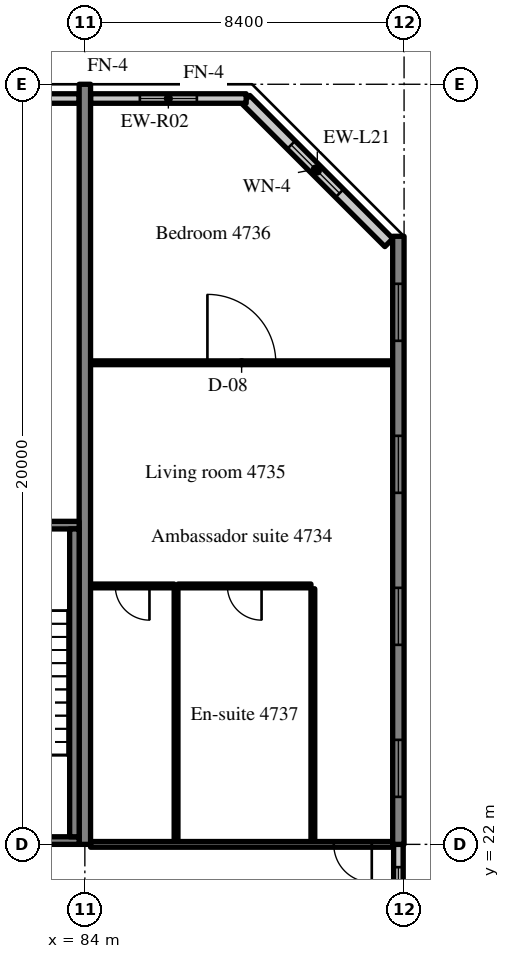
"""IFC4 building model, lengths in metres.
Left out: names, types, materials, properties, quantities, classifications, styles, units other than length and angle.
Written with IfcOpenShell. Run it as: python <this file> out.ifc"""

import sys

from ifc_helpers import new_model, si_unit, direction, frame, frame_2d, origin, place, context, subcontext, project, spatial, rectangle, extrude, source, transform, mapped, element, fill, save


model = new_model("IFC4")
c1 = context("Model", 3, precision=1e-05, world=origin(), true_north=direction((0.0, 1.0)))
c2 = subcontext(c1, "Body", "Model", "MODEL_VIEW")
j1 = project(units=[si_unit("LENGTHUNIT", "METRE"), si_unit("PLANEANGLEUNIT", "RADIAN")], contexts=[c1])
p1 = place(None, origin())
s1 = spatial("IfcSite", under=j1, at=p1, CompositionType="ELEMENT")
p2 = place(p1, origin())
s2 = spatial("IfcBuilding", under=s1, at=p2, CompositionType="ELEMENT")
p3 = place(p2, frame((0.0, 0.0, 193.4)))
s3 = spatial("IfcBuildingStorey", under=s2, at=p3, CompositionType="ELEMENT", Elevation=193.4)
m1 = source(origin(), c2, "Body", "SweptSolid", [
    extrude(rectangle(XDim=20.0, YDim=0.3, at=frame_2d((10.0, 0.0))), origin(), (0.0, 0.0, 1.0), 3.52),
])
p4 = place(p3, frame((84.0, 22.0, 0.0), z_axis=(0.0, 0.0, 1.0), x_axis=(0.0, 1.0, 0.0)))
e1 = element("IfcWall", 1, at=p4, inside=s3, PredefinedType="SHEAR", context=c2, shape_type="MappedRepresentation", body=[
    mapped(m1, transform((0.0, 0.0, 0.0), scale=1.0)),
])
m2 = source(origin(), c2, "Body", "SweptSolid", [
    extrude(rectangle(XDim=16.0, YDim=0.3, at=frame_2d((8.0, 0.0))), origin(), (0.0, 0.0, 1.0), 3.52),
])
p5 = place(p3, frame((92.25, 22.0, 0.0), z_axis=(0.0, 0.0, 1.0), x_axis=(0.0, 1.0, 0.0)))
e2 = element("IfcWall", 2, at=p5, inside=s3, PredefinedType="SHEAR", context=c2, shape_type="MappedRepresentation", body=[
    mapped(m2, transform((0.0, 0.0, 0.0), scale=1.0)),
])
m3 = source(origin(), c2, "Body", "SweptSolid", [
    extrude(rectangle(XDim=1.5, YDim=1.5, at=frame_2d((0.75, 0.75))), frame((0.0, 0.16, 0.0), z_axis=(0.0, -1.0, 0.0), x_axis=(1.0, 0.0, 0.0)), (0.0, 0.0, 1.0), 0.32),
])
p6 = place(p5, frame((1.25, 0.0, 0.9)))
e3 = element("IfcOpeningElement", 3, at=p6, cuts=e2, PredefinedType="OPENING", context=c2, shape_type="MappedRepresentation", body=[
    mapped(m3, transform((0.0, 0.0, 0.0), scale=1.0)),
])
p7 = place(p5, frame((5.25, 0.0, 0.9)))
e4 = element("IfcOpeningElement", 4, at=p7, cuts=e2, PredefinedType="OPENING", context=c2, shape_type="MappedRepresentation", body=[
    mapped(m3, transform((0.0, 0.0, 0.0), scale=1.0)),
])
p8 = place(p5, frame((9.25, 0.0, 0.9)))
e5 = element("IfcOpeningElement", 5, at=p8, cuts=e2, PredefinedType="OPENING", context=c2, shape_type="MappedRepresentation", body=[
    mapped(m3, transform((0.0, 0.0, 0.0), scale=1.0)),
])
p9 = place(p5, frame((13.25, 0.0, 0.9)))
e6 = element("IfcOpeningElement", 6, at=p9, cuts=e2, PredefinedType="OPENING", context=c2, shape_type="MappedRepresentation", body=[
    mapped(m3, transform((0.0, 0.0, 0.0), scale=1.0)),
])
m4 = source(origin(), c2, "Body", "SweptSolid", [
    extrude(rectangle(XDim=5.326, YDim=0.3, at=frame_2d((2.663, 0.0))), origin(), (0.0, 0.0, 1.0), 3.52),
])
p10 = place(p3, frame((92.0, 37.834, 0.0), z_axis=(0.0, 0.0, 1.0), x_axis=(-0.707083859269, 0.707129702361, 0.0)))
e7 = element("IfcWall", 7, at=p10, inside=s3, PredefinedType="SOLIDWALL", context=c2, shape_type="MappedRepresentation", body=[
    mapped(m4, transform((0.0, 0.0, 0.0), scale=1.0)),
])
m5 = source(origin(), c2, "Body", "SweptSolid", [
    extrude(rectangle(XDim=1.8, YDim=1.5, at=frame_2d((0.9, 0.75))), frame((0.0, 0.16, 0.0), z_axis=(0.0, -1.0, 0.0), x_axis=(1.0, 0.0, 0.0)), (0.0, 0.0, 1.0), 0.32),
])
p11 = place(p10, frame((1.836, 0.0, 0.9)))
e8 = element("IfcOpeningElement", 8, at=p11, cuts=e7, PredefinedType="OPENING", context=c2, shape_type="MappedRepresentation", body=[
    mapped(m5, transform((0.0, 0.0, 0.0), scale=1.0)),
])
m6 = source(origin(), c2, "Body", "SweptSolid", [
    extrude(rectangle(XDim=1.708, YDim=0.25, at=frame_2d((0.854, 0.0))), origin(), (0.0, 0.0, 1.0), 2.87),
])
p12 = place(p3, frame((83.85, 41.625, 0.0), z_axis=(0.0, 0.0, 1.0), x_axis=(-1.0, 0.0, 0.0)))
e9 = element("IfcWall", 9, at=p12, inside=s3, PredefinedType="SOLIDWALL", context=c2, shape_type="MappedRepresentation", body=[
    mapped(m6, transform((0.0, 0.0, 0.0), scale=1.0)),
])
m7 = source(origin(), c2, "Body", "SweptSolid", [
    extrude(rectangle(XDim=4.095, YDim=0.25, at=frame_2d((2.047, 0.0))), origin(), (0.0, 0.0, 1.0), 2.87),
])
p13 = place(p3, frame((88.245, 41.625, 0.0), z_axis=(0.0, 0.0, 1.0), x_axis=(-1.0, 0.0, 0.0)))
e10 = element("IfcWall", 10, at=p13, inside=s3, PredefinedType="SOLIDWALL", context=c2, shape_type="MappedRepresentation", body=[
    mapped(m7, transform((0.0, 0.0, 0.0), scale=1.0)),
])
m8 = source(origin(), c2, "Body", "SweptSolid", [
    extrude(rectangle(XDim=1.5, YDim=1.5, at=frame_2d((0.75, 0.75))), frame((0.0, 0.135, 0.0), z_axis=(0.0, -1.0, 0.0), x_axis=(1.0, 0.0, 0.0)), (0.0, 0.0, 1.0), 0.27),
])
p14 = place(p13, frame((1.297, 0.0, 0.9)))
e11 = element("IfcOpeningElement", 11, at=p14, cuts=e10, PredefinedType="OPENING", context=c2, shape_type="MappedRepresentation", body=[
    mapped(m8, transform((0.0, 0.0, 0.0), scale=1.0)),
])
m9 = source(origin(), c2, "Body", "SweptSolid", [
    extrude(rectangle(XDim=2.4, YDim=0.25, at=frame_2d((1.2, 0.0))), origin(), (0.0, 0.0, 1.0), 2.62),
])
p15 = place(p3, frame((92.25, 19.6, 0.0), z_axis=(0.0, 0.0, 1.0), x_axis=(0.0, 1.0, 0.0)))
e12 = element("IfcWall", 12, at=p15, inside=s3, PredefinedType="SOLIDWALL", context=c2, shape_type="MappedRepresentation", body=[
    mapped(m9, transform((0.0, 0.0, 0.0), scale=1.0)),
])
m10 = source(origin(), c2, "Body", "SweptSolid", [
    extrude(rectangle(XDim=1.2, YDim=1.5, at=frame_2d((0.6, 0.75))), frame((0.0, 0.135, 0.0), z_axis=(0.0, -1.0, 0.0), x_axis=(1.0, 0.0, 0.0)), (0.0, 0.0, 1.0), 0.27),
])
p16 = place(p15, frame((0.6, 0.0, 0.9)))
e13 = element("IfcOpeningElement", 13, at=p16, cuts=e12, PredefinedType="OPENING", context=c2, shape_type="MappedRepresentation", body=[
    mapped(m10, transform((0.0, 0.0, 0.0), scale=1.0)),
])
m11 = source(origin(), c2, "Body", "SweptSolid", [
    extrude(rectangle(XDim=8.25, YDim=0.2, at=frame_2d((4.125, 0.0))), origin(), (0.0, 0.0, 1.0), 3.52),
])
p17 = place(p3, frame((83.85, 22.1, 0.0), z_axis=(0.0, 0.0, 1.0), x_axis=(-1.0, 0.0, 0.0)))
e14 = element("IfcWall", 14, at=p17, inside=s3, PredefinedType="SOLIDWALL", context=c2, shape_type="MappedRepresentation", body=[
    mapped(m11, transform((0.0, 0.0, 0.0), scale=1.0)),
])
m12 = source(origin(), c2, "Body", "SweptSolid", [
    extrude(rectangle(XDim=1.2, YDim=2.1, at=frame_2d((0.6, 1.05))), frame((0.0, 0.11, 0.0), z_axis=(0.0, -1.0, 0.0), x_axis=(1.0, 0.0, 0.0)), (0.0, 0.0, 1.0), 0.22),
])
p18 = place(p17, frame((6.05, 0.0, 0.0)))
e15 = element("IfcOpeningElement", 15, at=p18, cuts=e14, PredefinedType="OPENING", context=c2, shape_type="MappedRepresentation", body=[
    mapped(m12, transform((0.0, 0.0, 0.0), scale=1.0)),
])
p19 = place(p3, frame((83.85, 30.4, 0.0), z_axis=(0.0, 0.0, 1.0), x_axis=(-1.0, 0.0, 0.0)))
e16 = element("IfcWall", 16, at=p19, inside=s3, PredefinedType="SOLIDWALL", context=c2, shape_type="MappedRepresentation", body=[
    mapped(m11, transform((0.0, 0.0, 0.0), scale=1.0)),
])
m13 = source(origin(), c2, "Body", "SweptSolid", [
    extrude(rectangle(XDim=1.0, YDim=2.1, at=frame_2d((0.5, 1.05))), frame((0.0, 0.11, 0.0), z_axis=(0.0, -1.0, 0.0), x_axis=(1.0, 0.0, 0.0)), (0.0, 0.0, 1.0), 0.22),
])
p20 = place(p19, frame((6.15, 0.0, 0.0)))
e17 = element("IfcOpeningElement", 17, at=p20, cuts=e16, PredefinedType="OPENING", context=c2, shape_type="MappedRepresentation", body=[
    mapped(m13, transform((0.0, 0.0, 0.0), scale=1.0)),
])
m14 = source(origin(), c2, "Body", "SweptSolid", [
    extrude(rectangle(XDim=8.1, YDim=0.25, at=frame_2d((4.05, 0.0))), origin(), (0.0, 0.0, 1.0), 3.52),
])
p21 = place(p3, frame((83.725, 22.2, 0.0), z_axis=(0.0, 0.0, 1.0), x_axis=(0.0, 1.0, 0.0)))
e18 = element("IfcWall", 18, at=p21, inside=s3, PredefinedType="SOLIDWALL", context=c2, shape_type="MappedRepresentation", body=[
    mapped(m14, transform((0.0, 0.0, 0.0), scale=1.0)),
])
m15 = source(origin(), c2, "Body", "SweptSolid", [
    extrude(rectangle(XDim=6.65, YDim=0.1, at=frame_2d((3.325, 0.0))), origin(), (0.0, 0.0, 1.0), 3.52),
])
for number, where, z_axis, x_axis in (
    (19, (90.0, 22.075, 0.0), (0.0, 0.0, 1.0), (0.0, 1.0, 0.0)),
    (20, (86.4, 22.075, 0.0), (0.0, 0.0, 1.0), (0.0, 1.0, 0.0)),
):
    element("IfcWall", number, at=place(p3, frame(where, z_axis=z_axis, x_axis=x_axis)), inside=s3, PredefinedType="PARTITIONING", context=c2, shape_type="MappedRepresentation", body=[
        mapped(m15, transform((0.0, 0.0, 0.0), scale=1.0)),
    ])
m16 = source(origin(), c2, "Body", "SweptSolid", [
    extrude(rectangle(XDim=3.5, YDim=0.1, at=frame_2d((1.75, 0.0))), origin(), (0.0, 0.0, 1.0), 3.52),
])
p22 = place(p3, frame((86.45, 28.8, 0.0), z_axis=(0.0, 0.0, 1.0), x_axis=(1.0, 0.0, 0.0)))
e21 = element("IfcWall", 21, at=p22, inside=s3, PredefinedType="PARTITIONING", context=c2, shape_type="MappedRepresentation", body=[
    mapped(m16, transform((0.0, 0.0, 0.0), scale=1.0)),
])
m17 = source(origin(), c2, "Body", "SweptSolid", [
    extrude(rectangle(XDim=0.9, YDim=2.1, at=frame_2d((0.45, 1.05))), frame((0.0, 0.06, 0.0), z_axis=(0.0, -1.0, 0.0), x_axis=(1.0, 0.0, 0.0)), (0.0, 0.0, 1.0), 0.12),
])
p23 = place(p22, frame((1.3, 0.0, 0.0)))
e22 = element("IfcOpeningElement", 22, at=p23, cuts=e21, PredefinedType="OPENING", context=c2, shape_type="MappedRepresentation", body=[
    mapped(m17, transform((0.0, 0.0, 0.0), scale=1.0)),
])
m18 = source(origin(), c2, "Body", "SweptSolid", [
    extrude(rectangle(XDim=2.2, YDim=0.1, at=frame_2d((1.1, 0.0))), origin(), (0.0, 0.0, 1.0), 3.52),
])
p24 = place(p3, frame((84.15, 28.8, 0.0), z_axis=(0.0, 0.0, 1.0), x_axis=(1.0, 0.0, 0.0)))
e23 = element("IfcWall", 23, at=p24, inside=s3, PredefinedType="PARTITIONING", context=c2, shape_type="MappedRepresentation", body=[
    mapped(m18, transform((0.0, 0.0, 0.0), scale=1.0)),
])
p25 = place(p24, frame((0.65, 0.0, 0.0)))
e24 = element("IfcOpeningElement", 24, at=p25, cuts=e23, PredefinedType="OPENING", context=c2, shape_type="MappedRepresentation", body=[
    mapped(m17, transform((0.0, 0.0, 0.0), scale=1.0)),
])
m19 = source(origin(), c2, "Body", "SweptSolid", [
    extrude(rectangle(XDim=7.95, YDim=0.1, at=frame_2d((3.975, 0.0))), origin(), (0.0, 0.0, 1.0), 3.52),
])
p26 = place(p3, frame((84.15, 34.672, 0.0), z_axis=(0.0, 0.0, 1.0), x_axis=(1.0, 0.0, 0.0)))
e25 = element("IfcWall", 25, at=p26, inside=s3, PredefinedType="PARTITIONING", context=c2, shape_type="MappedRepresentation", body=[
    mapped(m19, transform((0.0, 0.0, 0.0), scale=1.0)),
])
m20 = source(origin(), c2, "Body", "SweptSolid", [
    extrude(rectangle(XDim=1.8, YDim=2.1, at=frame_2d((0.9, 1.05))), frame((0.0, 0.06, 0.0), z_axis=(0.0, -1.0, 0.0), x_axis=(1.0, 0.0, 0.0)), (0.0, 0.0, 1.0), 0.12),
])
p27 = place(p26, frame((3.075, 0.0, 0.0)))
e26 = element("IfcOpeningElement", 26, at=p27, cuts=e25, PredefinedType="OPENING", context=c2, shape_type="MappedRepresentation", body=[
    mapped(m20, transform((0.0, 0.0, 0.0), scale=1.0)),
])
m21 = source(origin(), c2, "Body", "SweptSolid", [
    extrude(rectangle(XDim=7.95, YDim=0.15, at=frame_2d((3.975, 0.0))), origin(), (0.0, 0.0, 1.0), 2.82),
])
p28 = place(p3, frame((84.15, 22.0, 0.0), z_axis=(0.0, 0.0, 1.0), x_axis=(1.0, 0.0, 0.0)))
e27 = element("IfcWall", 27, at=p28, inside=s3, PredefinedType="PARTITIONING", context=c2, shape_type="MappedRepresentation", body=[
    mapped(m21, transform((0.0, 0.0, 0.0), scale=1.0)),
])
m22 = source(origin(), c2, "Body", "SweptSolid", [
    extrude(rectangle(XDim=1.0, YDim=2.1, at=frame_2d((0.5, 1.05))), frame((0.0, 0.085, 0.0), z_axis=(0.0, -1.0, 0.0), x_axis=(1.0, 0.0, 0.0)), (0.0, 0.0, 1.0), 0.17),
])
p29 = place(p28, frame((6.4, 0.0, 0.0)))
e28 = element("IfcOpeningElement", 28, at=p29, cuts=e27, PredefinedType="OPENING", context=c2, shape_type="MappedRepresentation", body=[
    mapped(m22, transform((0.0, 0.0, 0.0), scale=1.0)),
])
m23 = source(origin(), c2, "Body", "SweptSolid", [
    extrude(rectangle(XDim=1.8, YDim=1.5, at=frame_2d((0.9, 0.75))), frame((0.0, 0.03, 0.0), z_axis=(0.0, -1.0, 0.0), x_axis=(1.0, 0.0, 0.0)), (0.0, 0.0, 1.0), 0.06),
])
p30 = place(p11, origin())
e29 = element("IfcWindow", 29, at=p30, inside=s3, PartitioningType="SINGLE_PANEL", PredefinedType="WINDOW", context=c2, shape_type="MappedRepresentation", body=[
    mapped(m23, transform((0.0, 0.0, 0.0), scale=1.0)),
])
fill(e8, e29)
m24 = source(origin(), c2, "Body", "SweptSolid", [
    extrude(rectangle(XDim=1.5, YDim=1.5, at=frame_2d((0.75, 0.75))), frame((0.0, 0.03, 0.0), z_axis=(0.0, -1.0, 0.0), x_axis=(1.0, 0.0, 0.0)), (0.0, 0.0, 1.0), 0.06),
])
p31 = place(p14, origin())
e30 = element("IfcWindow", 30, at=p31, inside=s3, PartitioningType="SINGLE_PANEL", PredefinedType="WINDOW", context=c2, shape_type="MappedRepresentation", body=[
    mapped(m24, transform((0.0, 0.0, 0.0), scale=1.0)),
])
fill(e11, e30)
p32 = place(p6, origin())
e31 = element("IfcWindow", 31, at=p32, inside=s3, PartitioningType="SINGLE_PANEL", PredefinedType="WINDOW", context=c2, shape_type="MappedRepresentation", body=[
    mapped(m24, transform((0.0, 0.0, 0.0), scale=1.0)),
])
fill(e3, e31)
p33 = place(p7, origin())
e32 = element("IfcWindow", 32, at=p33, inside=s3, PartitioningType="SINGLE_PANEL", PredefinedType="WINDOW", context=c2, shape_type="MappedRepresentation", body=[
    mapped(m24, transform((0.0, 0.0, 0.0), scale=1.0)),
])
fill(e4, e32)
p34 = place(p8, origin())
e33 = element("IfcWindow", 33, at=p34, inside=s3, PartitioningType="SINGLE_PANEL", PredefinedType="WINDOW", context=c2, shape_type="MappedRepresentation", body=[
    mapped(m24, transform((0.0, 0.0, 0.0), scale=1.0)),
])
fill(e5, e33)
p35 = place(p9, origin())
e34 = element("IfcWindow", 34, at=p35, inside=s3, PartitioningType="SINGLE_PANEL", PredefinedType="WINDOW", context=c2, shape_type="MappedRepresentation", body=[
    mapped(m24, transform((0.0, 0.0, 0.0), scale=1.0)),
])
fill(e6, e34)
m25 = source(origin(), c2, "Body", "SweptSolid", [
    extrude(rectangle(XDim=1.2, YDim=1.5, at=frame_2d((0.6, 0.75))), frame((0.0, 0.03, 0.0), z_axis=(0.0, -1.0, 0.0), x_axis=(1.0, 0.0, 0.0)), (0.0, 0.0, 1.0), 0.06),
])
p36 = place(p16, origin())
e35 = element("IfcWindow", 35, at=p36, inside=s3, PartitioningType="SINGLE_PANEL", PredefinedType="WINDOW", context=c2, shape_type="MappedRepresentation", body=[
    mapped(m25, transform((0.0, 0.0, 0.0), scale=1.0)),
])
fill(e13, e35)
m26 = source(origin(), c2, "Body", "SweptSolid", [
    extrude(rectangle(XDim=0.9, YDim=2.1, at=frame_2d((0.45, 1.05))), frame((0.0, 0.025, 0.0), z_axis=(0.0, -1.0, 0.0), x_axis=(1.0, 0.0, 0.0)), (0.0, 0.0, 1.0), 0.05),
])
p37 = place(p23, origin())
e36 = element("IfcDoor", 36, at=p37, inside=s3, OperationType="SINGLE_SWING_RIGHT", PredefinedType="DOOR", context=c2, shape_type="MappedRepresentation", body=[
    mapped(m26, transform((0.0, 0.0, 0.0), scale=1.0)),
])
fill(e22, e36)
p38 = place(p25, origin())
e37 = element("IfcDoor", 37, at=p38, inside=s3, OperationType="SINGLE_SWING_RIGHT", PredefinedType="DOOR", context=c2, shape_type="MappedRepresentation", body=[
    mapped(m26, transform((0.0, 0.0, 0.0), scale=1.0)),
])
fill(e24, e37)
m27 = source(origin(), c2, "Body", "SweptSolid", [
    extrude(rectangle(XDim=1.8, YDim=2.1, at=frame_2d((0.9, 1.05))), frame((0.0, 0.025, 0.0), z_axis=(0.0, -1.0, 0.0), x_axis=(1.0, 0.0, 0.0)), (0.0, 0.0, 1.0), 0.05),
])
p39 = place(p27, origin())
e38 = element("IfcDoor", 38, at=p39, inside=s3, OperationType="DOUBLE_DOOR_SINGLE_SWING", PredefinedType="DOOR", context=c2, shape_type="MappedRepresentation", body=[
    mapped(m27, transform((0.0, 0.0, 0.0), scale=1.0)),
])
fill(e26, e38)
m28 = source(origin(), c2, "Body", "SweptSolid", [
    extrude(rectangle(XDim=1.0, YDim=2.1, at=frame_2d((0.5, 1.05))), frame((0.0, 0.025, 0.0), z_axis=(0.0, -1.0, 0.0), x_axis=(1.0, 0.0, 0.0)), (0.0, 0.0, 1.0), 0.05),
])
p40 = place(p29, origin())
e39 = element("IfcDoor", 39, at=p40, inside=s3, OperationType="SINGLE_SWING_RIGHT", PredefinedType="DOOR", context=c2, shape_type="MappedRepresentation", body=[
    mapped(m28, transform((0.0, 0.0, 0.0), scale=1.0)),
])
fill(e28, e39)
save(model, sys.argv[1])
